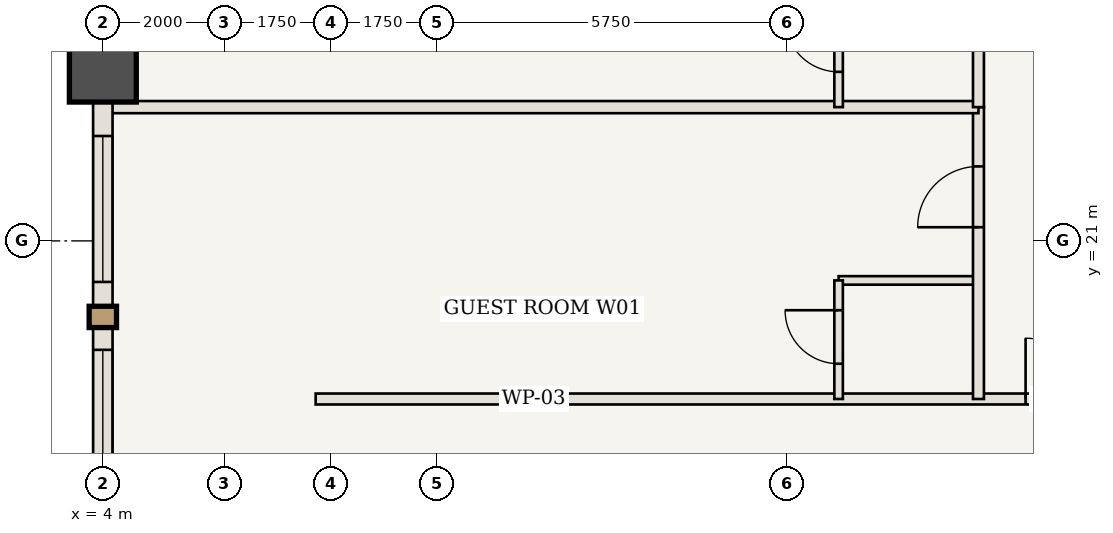
"""IFC4 building model, lengths in metres.
Left out: names, types, materials, properties, quantities, classifications, styles, units other than length and angle.
Written with IfcOpenShell. Run it as: python <this file> out.ifc"""

import sys

from ifc_helpers import new_model, si_unit, direction, frame, frame_2d, origin, origin_2d, place, context, subcontext, project, spatial, rectangle, extrude, element, fill, save


model = new_model("IFC4")
c1 = context("Model", 3, precision=1e-05, world=origin(), true_north=direction((0.0, 1.0)))
c2 = subcontext(c1, "Body", "Model", "MODEL_VIEW")
j1 = project(units=[si_unit("LENGTHUNIT", "METRE"), si_unit("PLANEANGLEUNIT", "RADIAN")], contexts=[c1])
p1 = place(None, origin())
s1 = spatial("IfcSite", under=j1, at=p1, CompositionType="ELEMENT")
p2 = place(p1, origin())
s2 = spatial("IfcBuilding", under=s1, at=p2, CompositionType="ELEMENT")
p3 = place(p2, frame((0.0, 0.0, 38.85)))
s3 = spatial("IfcBuildingStorey", under=s2, at=p3, CompositionType="ELEMENT", Elevation=38.85)
p4 = place(p3, frame((4.0, 23.833, 0.0), z_axis=(0.0, 0.0, 1.0), x_axis=(1.0, 0.0, 0.0)))
e1 = element("IfcColumn", 1, at=p4, inside=s3, PredefinedType="COLUMN", context=c2, shape_type="SweptSolid", body=[
    extrude(rectangle(XDim=1.1, YDim=1.1, at=origin_2d()), origin(), (0.0, 0.0, 1.0), 3.5),
])
p5 = place(p3, frame((7.5, 18.4, 0.0), z_axis=(0.0, 0.0, 1.0), x_axis=(1.0, 0.0, 0.0)))
e2 = element("IfcWall", 2, at=p5, inside=s3, PredefinedType="STANDARD", context=c2, shape_type="SweptSolid", body=[
    extrude(rectangle(XDim=16.3, YDim=0.18, at=frame_2d((8.15, 0.0))), origin(), (0.0, 0.0, 1.0), 3.08),
])
p6 = place(p5, frame((11.675, 0.0, 0.0)))
e3 = element("IfcOpeningElement", 3, at=p6, cuts=e2, PredefinedType="OPENING", context=c2, shape_type="SweptSolid", body=[
    extrude(rectangle(XDim=1.0, YDim=2.15, at=frame_2d((0.5, 1.075))), frame((0.0, 0.1, 0.0), z_axis=(0.0, -1.0, 0.0), x_axis=(1.0, 0.0, 0.0)), (0.0, 0.0, 1.0), 0.2),
])
p7 = place(p3, frame((16.1, 20.35, 0.0), z_axis=(0.0, 0.0, 1.0), x_axis=(1.0, 0.0, 0.0)))
e4 = element("IfcWall", 4, at=p7, inside=s3, PredefinedType="STANDARD", context=c2, shape_type="SweptSolid", body=[
    extrude(rectangle(XDim=2.3, YDim=0.14, at=frame_2d((1.15, 0.0))), origin(), (0.0, 0.0, 1.0), 3.08),
])
p8 = place(p3, frame((16.1, 18.4, 0.0), z_axis=(0.0, 0.0, 1.0), x_axis=(0.0, 1.0, 0.0)))
e5 = element("IfcWall", 5, at=p8, inside=s3, PredefinedType="STANDARD", context=c2, shape_type="SweptSolid", body=[
    extrude(rectangle(XDim=1.95, YDim=0.14, at=frame_2d((0.975, 0.0))), origin(), (0.0, 0.0, 1.0), 3.08),
])
p9 = place(p8, frame((0.58, 0.0, 0.0)))
e6 = element("IfcOpeningElement", 6, at=p9, cuts=e5, PredefinedType="OPENING", context=c2, shape_type="SweptSolid", body=[
    extrude(rectangle(XDim=0.88, YDim=2.1, at=frame_2d((0.44, 1.05))), frame((0.0, 0.08, 0.0), z_axis=(0.0, -1.0, 0.0), x_axis=(1.0, 0.0, 0.0)), (0.0, 0.0, 1.0), 0.16),
])
p10 = place(p3, frame((18.4, 18.4, 0.0), z_axis=(0.0, 0.0, 1.0), x_axis=(0.0, 1.0, 0.0)))
e7 = element("IfcWall", 7, at=p10, inside=s3, PredefinedType="STANDARD", context=c2, shape_type="SweptSolid", body=[
    extrude(rectangle(XDim=4.8, YDim=0.18, at=frame_2d((2.4, 0.0))), origin(), (0.0, 0.0, 1.0), 3.08),
])
p11 = place(p10, frame((2.825, 0.0, 0.0)))
e8 = element("IfcOpeningElement", 8, at=p11, cuts=e7, PredefinedType="OPENING", context=c2, shape_type="SweptSolid", body=[
    extrude(rectangle(XDim=1.0, YDim=2.15, at=frame_2d((0.5, 1.075))), frame((0.0, 0.1, 0.0), z_axis=(0.0, -1.0, 0.0), x_axis=(1.0, 0.0, 0.0)), (0.0, 0.0, 1.0), 0.2),
])
p12 = place(p3, frame((4.06, 23.2, 0.0), z_axis=(0.0, 0.0, 1.0), x_axis=(1.0, 0.0, 0.0)))
e9 = element("IfcWall", 9, at=p12, inside=s3, PredefinedType="STANDARD", context=c2, shape_type="SweptSolid", body=[
    extrude(rectangle(XDim=14.34, YDim=0.2, at=frame_2d((7.17, 0.0))), origin(), (0.0, 0.0, 1.0), 3.08),
])
p13 = place(p3, frame((16.1, 23.2, 0.0), z_axis=(0.0, 0.0, 1.0), x_axis=(0.0, 1.0, 0.0)))
e10 = element("IfcWall", 10, at=p13, inside=s3, PredefinedType="STANDARD", context=c2, shape_type="SweptSolid", body=[
    extrude(rectangle(XDim=1.95, YDim=0.14, at=frame_2d((0.975, 0.0))), origin(), (0.0, 0.0, 1.0), 3.08),
])
p14 = place(p13, frame((0.58, 0.0, 0.0)))
e11 = element("IfcOpeningElement", 11, at=p14, cuts=e10, PredefinedType="OPENING", context=c2, shape_type="SweptSolid", body=[
    extrude(rectangle(XDim=0.88, YDim=2.1, at=frame_2d((0.44, 1.05))), frame((0.0, 0.08, 0.0), z_axis=(0.0, -1.0, 0.0), x_axis=(1.0, 0.0, 0.0)), (0.0, 0.0, 1.0), 0.16),
])
p15 = place(p3, frame((18.4, 23.2, 0.0), z_axis=(0.0, 0.0, 1.0), x_axis=(0.0, 1.0, 0.0)))
e12 = element("IfcWall", 12, at=p15, inside=s3, PredefinedType="STANDARD", context=c2, shape_type="SweptSolid", body=[
    extrude(rectangle(XDim=4.7, YDim=0.18, at=frame_2d((2.35, 0.0))), origin(), (0.0, 0.0, 1.0), 3.08),
])
p16 = place(p15, frame((2.775, 0.0, 0.0)))
e13 = element("IfcOpeningElement", 13, at=p16, cuts=e12, PredefinedType="OPENING", context=c2, shape_type="SweptSolid", body=[
    extrude(rectangle(XDim=1.0, YDim=2.15, at=frame_2d((0.5, 1.075))), frame((0.0, 0.1, 0.0), z_axis=(0.0, -1.0, 0.0), x_axis=(1.0, 0.0, 0.0)), (0.0, 0.0, 1.0), 0.2),
])
p17 = place(p3, frame((4.0, 15.667, 0.0), z_axis=(0.0, 0.0, 1.0), x_axis=(0.0, 1.0, 0.0)))
e14 = element("IfcWall", 14, at=p17, inside=s3, PredefinedType="USERDEFINED", context=c2, shape_type="SweptSolid", body=[
    extrude(rectangle(XDim=8.167, YDim=0.32, at=frame_2d((4.083, 0.0))), origin(), (0.0, 0.0, 1.0), 2.28),
])
p18 = place(p17, frame((0.742, 0.0, 0.85)))
e15 = element("IfcOpeningElement", 15, at=p18, cuts=e14, PredefinedType="OPENING", context=c2, shape_type="SweptSolid", body=[
    extrude(rectangle(XDim=2.8, YDim=1.23, at=frame_2d((1.4, 0.615))), frame((0.0, 0.17, 0.0), z_axis=(0.0, -1.0, 0.0), x_axis=(1.0, 0.0, 0.0)), (0.0, 0.0, 1.0), 0.34),
])
p19 = place(p17, frame((4.658, 0.0, 0.85)))
e16 = element("IfcOpeningElement", 16, at=p19, cuts=e14, PredefinedType="OPENING", context=c2, shape_type="SweptSolid", body=[
    extrude(rectangle(XDim=2.4, YDim=1.23, at=frame_2d((1.2, 0.615))), frame((0.0, 0.17, 0.0), z_axis=(0.0, -1.0, 0.0), x_axis=(1.0, 0.0, 0.0)), (0.0, 0.0, 1.0), 0.34),
])
p20 = place(p3, frame((4.0, 23.833, 0.0), z_axis=(0.0, 0.0, 1.0), x_axis=(0.0, 1.0, 0.0)))
e17 = element("IfcWall", 17, at=p20, inside=s3, PredefinedType="USERDEFINED", context=c2, shape_type="SweptSolid", body=[
    extrude(rectangle(XDim=8.167, YDim=0.32, at=frame_2d((4.083, 0.0))), origin(), (0.0, 0.0, 1.0), 2.28),
])
p21 = place(p20, frame((0.983, 0.0, 0.85)))
e18 = element("IfcOpeningElement", 18, at=p21, cuts=e17, PredefinedType="OPENING", context=c2, shape_type="SweptSolid", body=[
    extrude(rectangle(XDim=2.4, YDim=1.23, at=frame_2d((1.2, 0.615))), frame((0.0, 0.17, 0.0), z_axis=(0.0, -1.0, 0.0), x_axis=(1.0, 0.0, 0.0)), (0.0, 0.0, 1.0), 0.34),
])
p22 = place(p20, frame((4.767, 0.0, 0.85)))
e19 = element("IfcOpeningElement", 19, at=p22, cuts=e17, PredefinedType="OPENING", context=c2, shape_type="SweptSolid", body=[
    extrude(rectangle(XDim=2.4, YDim=1.23, at=frame_2d((1.2, 0.615))), frame((0.0, 0.17, 0.0), z_axis=(0.0, -1.0, 0.0), x_axis=(1.0, 0.0, 0.0)), (0.0, 0.0, 1.0), 0.34),
])
p23 = place(p6, origin())
e20 = element("IfcDoor", 20, at=p23, inside=s3, OperationType="SINGLE_SWING_LEFT", PredefinedType="DOOR", context=c2, shape_type="SweptSolid", body=[
    extrude(rectangle(XDim=1.0, YDim=2.15, at=frame_2d((0.5, 1.075))), frame((0.0, 0.025, 0.0), z_axis=(0.0, -1.0, 0.0), x_axis=(1.0, 0.0, 0.0)), (0.0, 0.0, 1.0), 0.05),
])
fill(e3, e20)
p24 = place(p9, origin())
e21 = element("IfcDoor", 21, at=p24, inside=s3, OperationType="SINGLE_SWING_RIGHT", PredefinedType="DOOR", context=c2, shape_type="SweptSolid", body=[
    extrude(rectangle(XDim=0.88, YDim=2.1, at=frame_2d((0.44, 1.05))), frame((0.0, 0.025, 0.0), z_axis=(0.0, -1.0, 0.0), x_axis=(1.0, 0.0, 0.0)), (0.0, 0.0, 1.0), 0.05),
])
fill(e6, e21)
p25 = place(p11, origin())
e22 = element("IfcDoor", 22, at=p25, inside=s3, OperationType="SINGLE_SWING_LEFT", PredefinedType="DOOR", context=c2, shape_type="SweptSolid", body=[
    extrude(rectangle(XDim=1.0, YDim=2.15, at=frame_2d((0.5, 1.075))), frame((0.0, 0.025, 0.0), z_axis=(0.0, -1.0, 0.0), x_axis=(1.0, 0.0, 0.0)), (0.0, 0.0, 1.0), 0.05),
])
fill(e8, e22)
p26 = place(p14, origin())
e23 = element("IfcDoor", 23, at=p26, inside=s3, OperationType="SINGLE_SWING_RIGHT", PredefinedType="DOOR", context=c2, shape_type="SweptSolid", body=[
    extrude(rectangle(XDim=0.88, YDim=2.1, at=frame_2d((0.44, 1.05))), frame((0.0, 0.025, 0.0), z_axis=(0.0, -1.0, 0.0), x_axis=(1.0, 0.0, 0.0)), (0.0, 0.0, 1.0), 0.05),
])
fill(e11, e23)
p27 = place(p18, origin())
e24 = element("IfcWindow", 24, at=p27, inside=s3, PartitioningType="SINGLE_PANEL", PredefinedType="WINDOW", context=c2, shape_type="SweptSolid", body=[
    extrude(rectangle(XDim=2.8, YDim=1.23, at=frame_2d((1.4, 0.615))), frame((0.0, 0.03, 0.0), z_axis=(0.0, -1.0, 0.0), x_axis=(1.0, 0.0, 0.0)), (0.0, 0.0, 1.0), 0.06),
])
fill(e15, e24)
p28 = place(p19, origin())
e25 = element("IfcWindow", 25, at=p28, inside=s3, PartitioningType="SINGLE_PANEL", PredefinedType="WINDOW", context=c2, shape_type="SweptSolid", body=[
    extrude(rectangle(XDim=2.4, YDim=1.23, at=frame_2d((1.2, 0.615))), frame((0.0, 0.03, 0.0), z_axis=(0.0, -1.0, 0.0), x_axis=(1.0, 0.0, 0.0)), (0.0, 0.0, 1.0), 0.06),
])
fill(e16, e25)
save(model, sys.argv[1])
